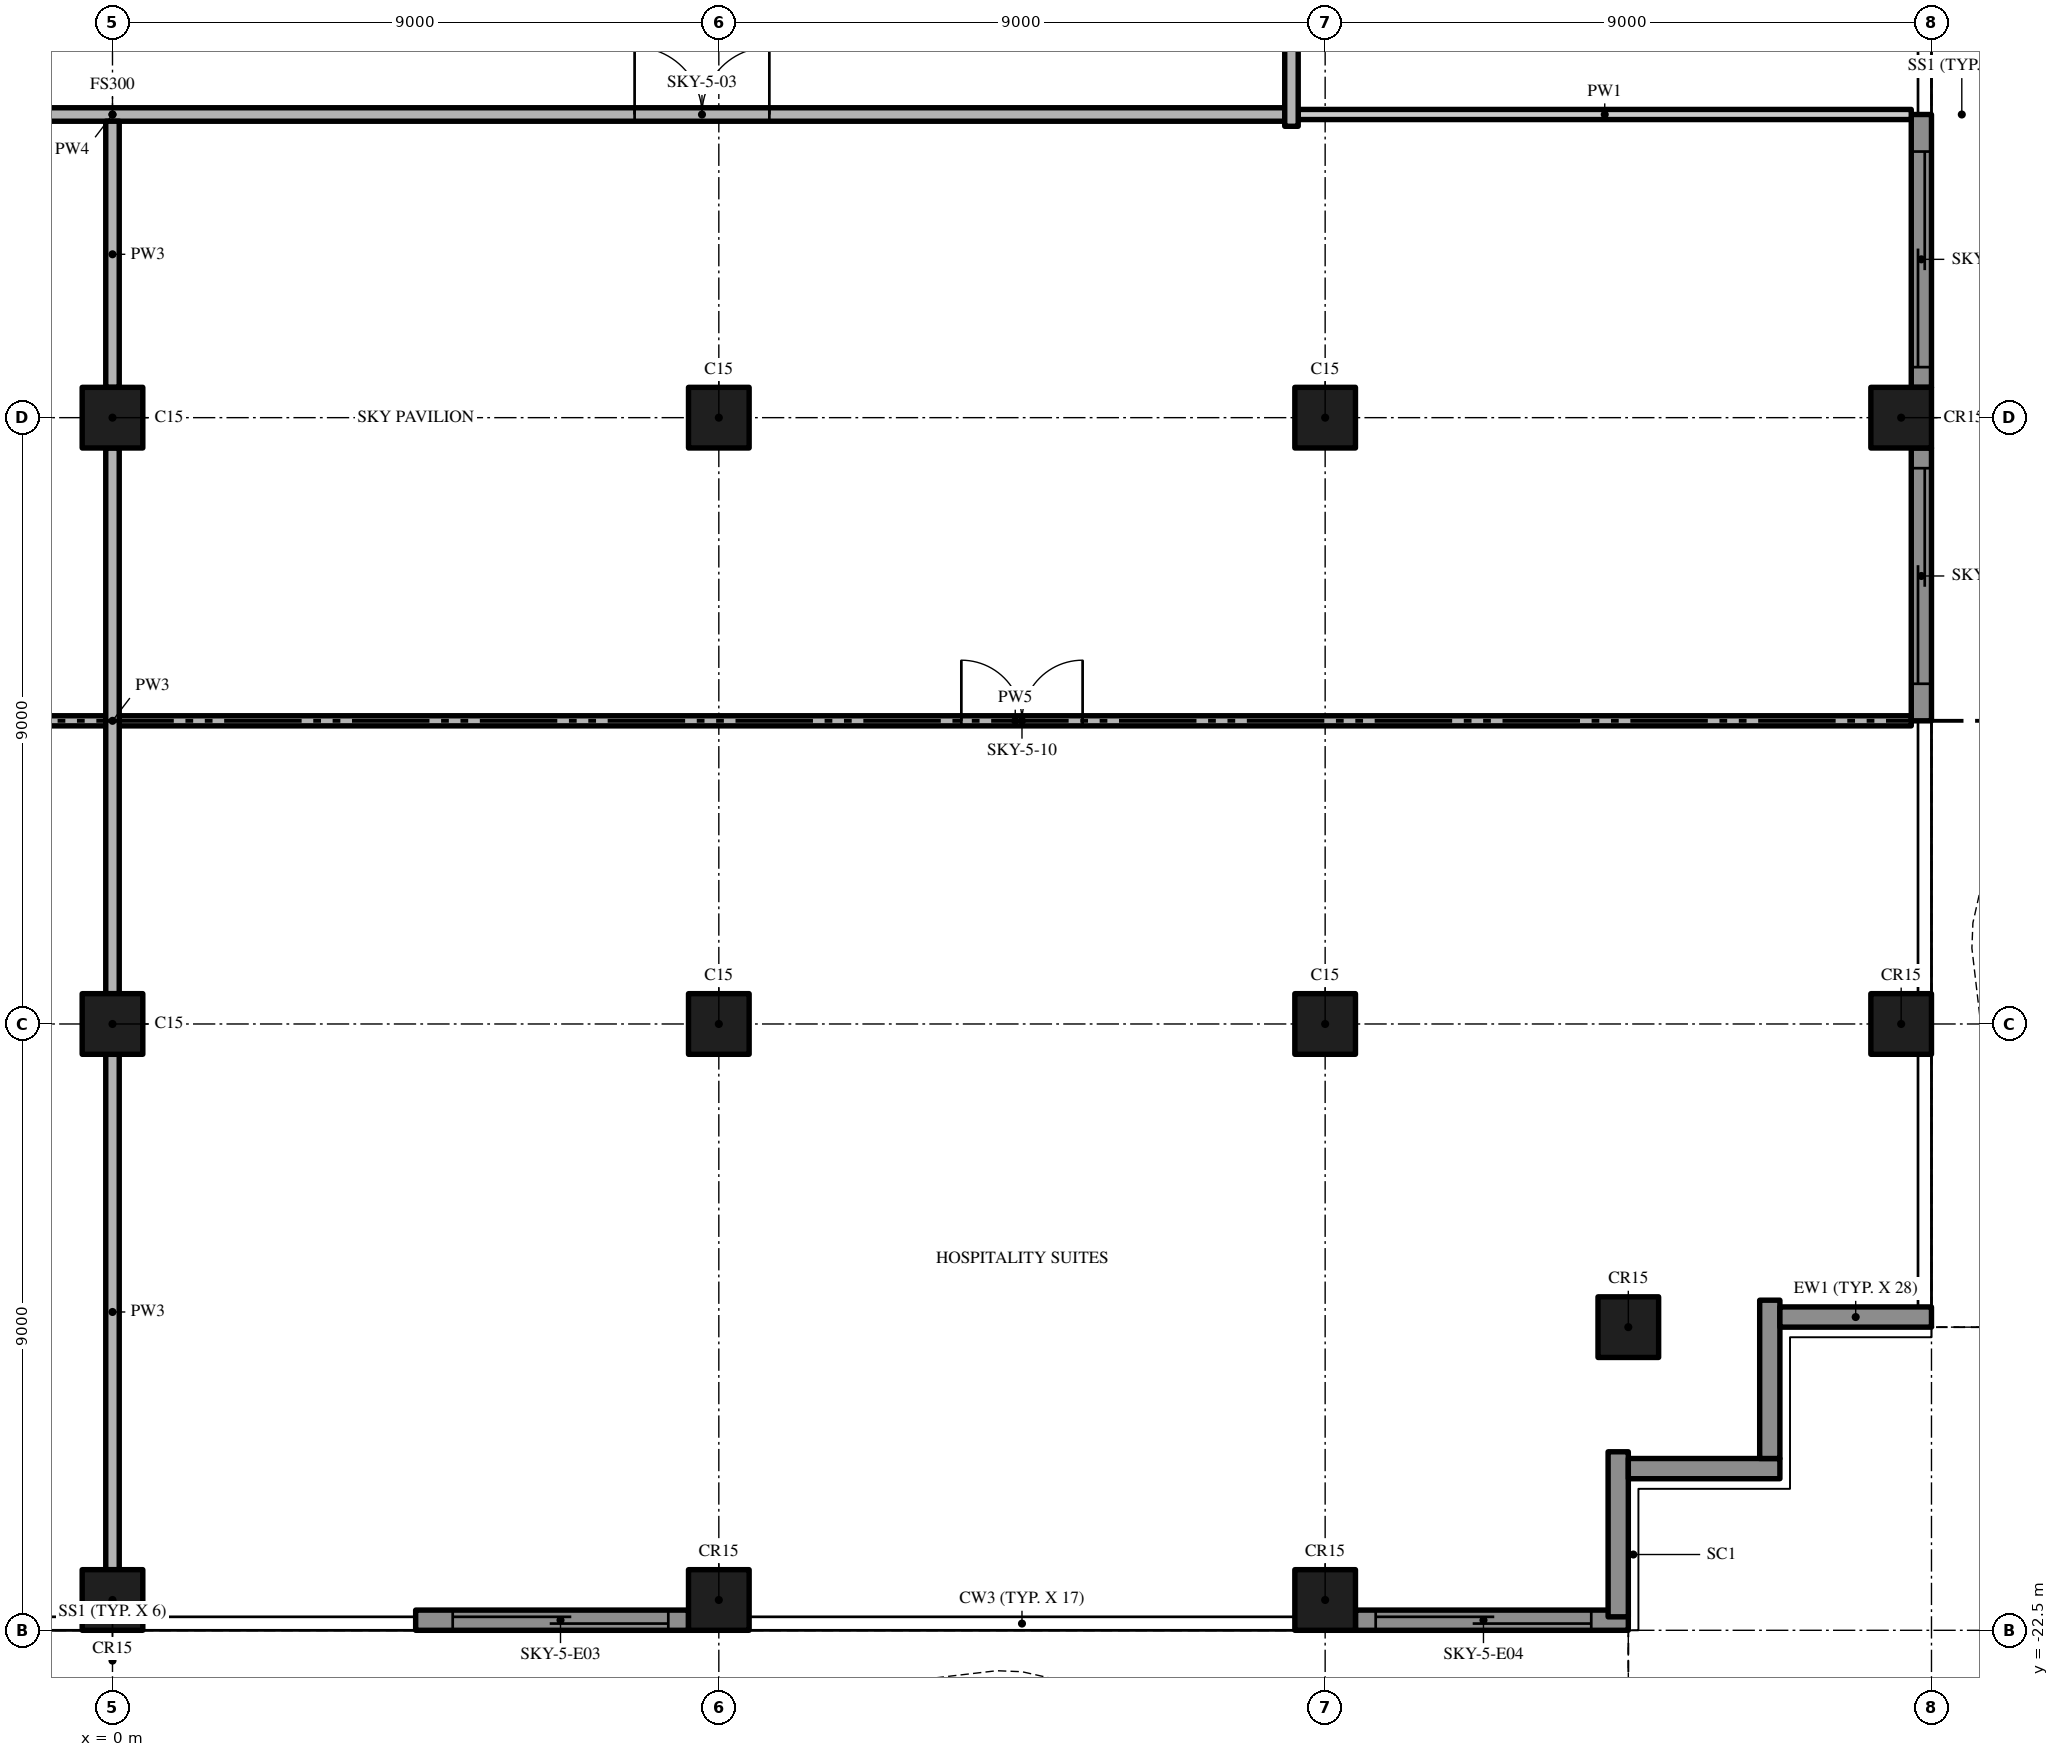
"""IFC4 building model, lengths in metres.
Left out: names, types, materials, properties, quantities, classifications, styles, units other than length and angle.
Written with IfcOpenShell. Run it as: python <this file> out.ifc"""

import sys

from ifc_helpers import new_model, si_unit, direction, frame, frame_2d, origin, origin_2d, place, context, subcontext, project, spatial, polyline, rectangle, outline, extrude, element, fill, save


model = new_model("IFC4")
c1 = context("Model", 3, precision=1e-05, world=origin(), true_north=direction((0.0, 1.0)))
c2 = subcontext(c1, "Body", "Model", "MODEL_VIEW")
j1 = project(units=[si_unit("LENGTHUNIT", "METRE"), si_unit("PLANEANGLEUNIT", "RADIAN")], contexts=[c1])
p1 = place(None, origin())
s1 = spatial("IfcSite", under=j1, at=p1, CompositionType="ELEMENT")
p2 = place(p1, origin())
s2 = spatial("IfcBuilding", under=s1, at=p2, CompositionType="ELEMENT")
p3 = place(p2, frame((0.0, 0.0, 284.4)))
s3 = spatial("IfcBuildingStorey", under=s2, at=p3, CompositionType="ELEMENT", Elevation=284.4)
for number, where, z_axis, x_axis in (
    (1, (0.0, -13.5, 0.0), (0.0, 0.0, 1.0), (1.0, 0.0, 0.0)),
    (2, (0.0, -22.05, 0.0), (0.0, 0.0, 1.0), (1.0, 0.0, 0.0)),
    (3, (0.0, -4.5, 0.0), (0.0, 0.0, 1.0), (1.0, 0.0, 0.0)),
    (4, (18.0, -13.5, 0.0), (0.0, 0.0, 1.0), (1.0, 0.0, 0.0)),
    (5, (18.0, -22.05, 0.0), (0.0, 0.0, 1.0), (1.0, 0.0, 0.0)),
    (6, (18.0, -4.5, 0.0), (0.0, 0.0, 1.0), (1.0, 0.0, 0.0)),
    (7, (26.55, -13.5, 0.0), (0.0, 0.0, 1.0), (1.0, 0.0, 0.0)),
    (8, (22.5, -18.0, 0.0), (0.0, 0.0, 1.0), (1.0, 0.0, 0.0)),
    (9, (26.55, -4.5, 0.0), (0.0, 0.0, 1.0), (1.0, 0.0, 0.0)),
    (10, (9.0, -13.5, 0.0), (0.0, 0.0, 1.0), (1.0, 0.0, 0.0)),
    (11, (9.0, -22.05, 0.0), (0.0, 0.0, 1.0), (1.0, 0.0, 0.0)),
    (12, (9.0, -4.5, 0.0), (0.0, 0.0, 1.0), (1.0, 0.0, 0.0)),
):
    element("IfcColumn", number, at=place(p3, frame(where, z_axis=z_axis, x_axis=x_axis)), inside=s3, PredefinedType="COLUMN", context=c2, shape_type="SweptSolid", body=[
        extrude(rectangle(XDim=0.9, YDim=0.9, at=origin_2d()), origin(), (0.0, 0.0, 1.0), 4.7),
    ])
p4 = place(p3, frame((8.55, -22.35, 0.0), z_axis=(0.0, 0.0, 1.0), x_axis=(-1.0, 0.0, 0.0)))
e13 = element("IfcWall", 13, at=p4, inside=s3, PredefinedType="SOLIDWALL", context=c2, shape_type="SweptSolid", body=[
    extrude(rectangle(XDim=4.05, YDim=0.3, at=frame_2d((2.025, 0.0))), origin(), (0.0, 0.0, 1.0), 4.7),
])
p5 = place(p4, frame((0.3, 0.0, 0.0)))
e14 = element("IfcOpeningElement", 14, at=p5, cuts=e13, PredefinedType="OPENING", context=c2, shape_type="SweptSolid", body=[
    extrude(rectangle(XDim=3.2, YDim=2.4, at=frame_2d((1.6, 1.2))), frame((0.0, 0.16, 0.0), z_axis=(0.0, -1.0, 0.0), x_axis=(1.0, 0.0, 0.0)), (0.0, 0.0, 1.0), 0.32),
])
p6 = place(p3, frame((22.5, -22.35, 0.0), z_axis=(0.0, 0.0, 1.0), x_axis=(-1.0, 0.0, 0.0)))
e15 = element("IfcWall", 15, at=p6, inside=s3, PredefinedType="SOLIDWALL", context=c2, shape_type="SweptSolid", body=[
    extrude(rectangle(XDim=4.05, YDim=0.3, at=frame_2d((2.025, 0.0))), origin(), (0.0, 0.0, 1.0), 4.7),
])
p7 = place(p6, frame((0.55, 0.0, 0.0)))
e16 = element("IfcOpeningElement", 16, at=p7, cuts=e15, PredefinedType="OPENING", context=c2, shape_type="SweptSolid", body=[
    extrude(rectangle(XDim=3.2, YDim=2.4, at=frame_2d((1.6, 1.2))), frame((0.0, 0.16, 0.0), z_axis=(0.0, -1.0, 0.0), x_axis=(1.0, 0.0, 0.0)), (0.0, 0.0, 1.0), 0.32),
])
p8 = place(p3, frame((22.35, -19.85, 0.0), z_axis=(0.0, 0.0, 1.0), x_axis=(0.0, -1.0, 0.0)))
e17 = element("IfcWall", 17, at=p8, inside=s3, PredefinedType="SOLIDWALL", context=c2, shape_type="SweptSolid", body=[
    extrude(rectangle(XDim=2.45, YDim=0.3, at=frame_2d((1.225, 0.0))), origin(), (0.0, 0.0, 1.0), 4.7),
])
p9 = place(p3, frame((24.75, -20.1, 0.0), z_axis=(0.0, 0.0, 1.0), x_axis=(-1.0, 0.0, 0.0)))
e18 = element("IfcWall", 18, at=p9, inside=s3, PredefinedType="SOLIDWALL", context=c2, shape_type="SweptSolid", body=[
    extrude(rectangle(XDim=2.25, YDim=0.3, at=frame_2d((1.125, 0.0))), origin(), (0.0, 0.0, 1.0), 4.7),
])
p10 = place(p3, frame((24.6, -17.6, 0.0), z_axis=(0.0, 0.0, 1.0), x_axis=(0.0, -1.0, 0.0)))
e19 = element("IfcWall", 19, at=p10, inside=s3, PredefinedType="SOLIDWALL", context=c2, shape_type="SweptSolid", body=[
    extrude(rectangle(XDim=2.35, YDim=0.3, at=frame_2d((1.175, 0.0))), origin(), (0.0, 0.0, 1.0), 4.7),
])
p11 = place(p3, frame((27.0, -17.85, 0.0), z_axis=(0.0, 0.0, 1.0), x_axis=(-1.0, 0.0, 0.0)))
e20 = element("IfcWall", 20, at=p11, inside=s3, PredefinedType="SOLIDWALL", context=c2, shape_type="SweptSolid", body=[
    extrude(rectangle(XDim=2.25, YDim=0.3, at=frame_2d((1.125, 0.0))), origin(), (0.0, 0.0, 1.0), 4.7),
])
p12 = place(p3, frame((26.85, -4.95, 0.0), z_axis=(0.0, 0.0, 1.0), x_axis=(0.0, -1.0, 0.0)))
e21 = element("IfcWall", 21, at=p12, inside=s3, PredefinedType="SOLIDWALL", context=c2, shape_type="SweptSolid", body=[
    extrude(rectangle(XDim=4.05, YDim=0.3, at=frame_2d((2.025, 0.0))), origin(), (0.0, 0.0, 1.0), 4.7),
])
p13 = place(p12, frame((0.3, 0.0, 0.0)))
e22 = element("IfcOpeningElement", 22, at=p13, cuts=e21, PredefinedType="OPENING", context=c2, shape_type="SweptSolid", body=[
    extrude(rectangle(XDim=3.2, YDim=2.4, at=frame_2d((1.6, 1.2))), frame((0.0, 0.16, 0.0), z_axis=(0.0, -1.0, 0.0), x_axis=(1.0, 0.0, 0.0)), (0.0, 0.0, 1.0), 0.32),
])
p14 = place(p3, frame((26.85, 0.0, 0.0), z_axis=(0.0, 0.0, 1.0), x_axis=(0.0, -1.0, 0.0)))
e23 = element("IfcWall", 23, at=p14, inside=s3, PredefinedType="SOLIDWALL", context=c2, shape_type="SweptSolid", body=[
    extrude(rectangle(XDim=4.05, YDim=0.3, at=frame_2d((2.025, 0.0))), origin(), (0.0, 0.0, 1.0), 4.7),
])
p15 = place(p14, frame((0.55, 0.0, 0.0)))
e24 = element("IfcOpeningElement", 24, at=p15, cuts=e23, PredefinedType="OPENING", context=c2, shape_type="SweptSolid", body=[
    extrude(rectangle(XDim=3.2, YDim=2.4, at=frame_2d((1.6, 1.2))), frame((0.0, 0.16, 0.0), z_axis=(0.0, -1.0, 0.0), x_axis=(1.0, 0.0, 0.0)), (0.0, 0.0, 1.0), 0.32),
])
p16 = place(p3, origin())
e25 = element("IfcWall", 25, at=p16, inside=s3, PredefinedType="USERDEFINED", context=c2, shape_type="SweptSolid", body=[
    extrude(outline(polyline([(-22.5, -25.149), (-21.0, -24.488), (-19.5, -23.755), (-18.0, -23.231), (-16.875, -23.1), (-16.5, -23.115), (-15.0, -23.451), (-13.5, -24.112), (-12.0, -24.845), (-10.5, -25.369), (-9.375, -25.5), (-9.0, -25.485), (-7.5, -25.149), (-6.0, -24.488), (-4.5, -23.755), (-3.0, -23.231), (-1.875, -23.1), (-1.5, -23.115), (0.0, -23.451), (1.5, -24.112), (3.0, -24.845), (4.5, -25.369), (5.625, -25.5), (6.0, -25.485), (7.5, -25.149), (9.0, -24.488), (10.5, -23.755), (12.0, -23.231), (13.125, -23.1), (13.5, -23.115), (15.0, -23.451), (16.5, -24.112), (18.0, -24.845), (19.5, -25.369), (20.625, -25.5), (21.0, -25.485), (22.5, -25.149), (22.445, -24.905), (20.967, -25.236), (20.635, -25.249), (19.556, -25.124), (18.096, -24.614), (16.605, -23.885), (15.079, -23.213), (13.533, -22.866), (13.115, -22.849), (11.944, -22.986), (10.404, -23.524), (8.895, -24.261), (7.421, -24.91), (5.967, -25.236), (5.635, -25.249), (4.556, -25.124), (3.096, -24.614), (1.605, -23.885), (0.079, -23.213), (-1.467, -22.866), (-1.885, -22.849), (-3.056, -22.986), (-4.596, -23.524), (-6.105, -24.261), (-7.579, -24.91), (-9.033, -25.236), (-9.365, -25.249), (-10.444, -25.124), (-11.904, -24.614), (-13.395, -23.885), (-14.921, -23.213), (-16.467, -22.866), (-16.885, -22.849), (-18.056, -22.986), (-19.596, -23.524), (-21.105, -24.261), (-22.601, -24.92), (-22.5, -25.149)])), origin(), (0.0, 0.0, 1.0), 0.9),
])
p17 = place(p3, origin())
e26 = element("IfcWall", 26, at=p17, inside=s3, PredefinedType="USERDEFINED", context=c2, shape_type="SweptSolid", body=[
    extrude(outline(polyline([(29.649, -18.0), (28.988, -16.5), (28.255, -15.0), (27.731, -13.5), (27.6, -12.375), (27.615, -12.0), (27.951, -10.5), (28.612, -9.0), (29.345, -7.5), (29.869, -6.0), (30.0, -4.875), (29.985, -4.5), (29.649, -3.0), (28.988, -1.5), (28.255, 0.0), (27.731, 1.5), (27.6, 2.625), (27.615, 3.0), (27.951, 4.5), (28.612, 6.0), (29.345, 7.5), (29.869, 9.0), (30.0, 10.125), (29.985, 10.5), (29.649, 12.0), (28.988, 13.5), (28.255, 15.0), (27.731, 16.5), (27.6, 17.625), (27.615, 18.0), (27.365, 18.01), (27.349, 17.615), (27.486, 16.444), (28.024, 14.904), (28.761, 13.395), (29.41, 11.921), (29.736, 10.467), (29.749, 10.135), (29.624, 9.056), (29.114, 7.596), (28.385, 6.105), (27.713, 4.579), (27.366, 3.033), (27.349, 2.615), (27.486, 1.444), (28.024, -0.096), (28.761, -1.605), (29.41, -3.079), (29.736, -4.533), (29.749, -4.865), (29.624, -5.944), (29.114, -7.404), (28.385, -8.895), (27.713, -10.421), (27.366, -11.967), (27.349, -12.385), (27.486, -13.556), (28.024, -15.096), (28.761, -16.605), (29.42, -18.101), (29.649, -18.0)])), origin(), (0.0, 0.0, 1.0), 0.9),
])
p18 = place(p3, frame((-26.7, -9.0, 0.0), z_axis=(0.0, 0.0, 1.0), x_axis=(1.0, 0.0, 0.0)))
e27 = element("IfcWall", 27, at=p18, inside=s3, PredefinedType="PARTITIONING", context=c2, shape_type="SweptSolid", body=[
    extrude(rectangle(XDim=26.6, YDim=0.15, at=frame_2d((13.3, 0.0))), origin(), (0.0, 0.0, 1.0), 4.7),
])
p19 = place(p18, frame((12.3, 0.0, 0.0)))
e28 = element("IfcOpeningElement", 28, at=p19, cuts=e27, PredefinedType="OPENING", context=c2, shape_type="SweptSolid", body=[
    extrude(rectangle(XDim=1.8, YDim=2.4, at=frame_2d((0.9, 1.2))), frame((0.0, 0.085, 0.0), z_axis=(0.0, -1.0, 0.0), x_axis=(1.0, 0.0, 0.0)), (0.0, 0.0, 1.0), 0.17),
])
p20 = place(p3, frame((0.1, -9.0, 0.0), z_axis=(0.0, 0.0, 1.0), x_axis=(1.0, 0.0, 0.0)))
e29 = element("IfcWall", 29, at=p20, inside=s3, PredefinedType="PARTITIONING", context=c2, shape_type="SweptSolid", body=[
    extrude(rectangle(XDim=26.6, YDim=0.15, at=frame_2d((13.3, 0.0))), origin(), (0.0, 0.0, 1.0), 4.7),
])
p21 = place(p20, frame((12.5, 0.0, 0.0)))
e30 = element("IfcOpeningElement", 30, at=p21, cuts=e29, PredefinedType="OPENING", context=c2, shape_type="SweptSolid", body=[
    extrude(rectangle(XDim=1.8, YDim=2.4, at=frame_2d((0.9, 1.2))), frame((0.0, 0.085, 0.0), z_axis=(0.0, -1.0, 0.0), x_axis=(1.0, 0.0, 0.0)), (0.0, 0.0, 1.0), 0.17),
])
p22 = place(p3, frame((-17.4, 0.0, 0.0), z_axis=(0.0, 0.0, 1.0), x_axis=(1.0, 0.0, 0.0)))
e31 = element("IfcWall", 31, at=p22, inside=s3, PredefinedType="PARTITIONING", context=c2, shape_type="SweptSolid", body=[
    extrude(rectangle(XDim=34.8, YDim=0.2, at=frame_2d((17.4, 0.0))), origin(), (0.0, 0.0, 1.0), 4.7),
])
p23 = place(p22, frame((7.65, 0.0, 0.0)))
e32 = element("IfcOpeningElement", 32, at=p23, cuts=e31, PredefinedType="OPENING", context=c2, shape_type="SweptSolid", body=[
    extrude(rectangle(XDim=2.0, YDim=2.4, at=frame_2d((1.0, 1.2))), frame((0.0, 0.11, 0.0), z_axis=(0.0, -1.0, 0.0), x_axis=(1.0, 0.0, 0.0)), (0.0, 0.0, 1.0), 0.22),
])
p24 = place(p22, frame((25.15, 0.0, 0.0)))
e33 = element("IfcOpeningElement", 33, at=p24, cuts=e31, PredefinedType="OPENING", context=c2, shape_type="SweptSolid", body=[
    extrude(rectangle(XDim=2.0, YDim=2.4, at=frame_2d((1.0, 1.2))), frame((0.0, 0.11, 0.0), z_axis=(0.0, -1.0, 0.0), x_axis=(1.0, 0.0, 0.0)), (0.0, 0.0, 1.0), 0.22),
])
p25 = place(p3, frame((17.6, 0.0, 0.0), z_axis=(0.0, 0.0, 1.0), x_axis=(1.0, 0.0, 0.0)))
e34 = element("IfcWall", 34, at=p25, inside=s3, PredefinedType="PARTITIONING", context=c2, shape_type="SweptSolid", body=[
    extrude(rectangle(XDim=9.1, YDim=0.15, at=frame_2d((4.55, 0.0))), origin(), (0.0, 0.0, 1.0), 4.7),
])
p26 = place(p3, frame((0.0, -21.6, 0.0), z_axis=(0.0, 0.0, 1.0), x_axis=(0.0, 1.0, 0.0)))
e35 = element("IfcWall", 35, at=p26, inside=s3, PredefinedType="PARTITIONING", context=c2, shape_type="SweptSolid", body=[
    extrude(rectangle(XDim=7.65, YDim=0.2, at=frame_2d((3.825, 0.0))), origin(), (0.0, 0.0, 1.0), 4.7),
])
p27 = place(p3, frame((0.0, -13.05, 0.0), z_axis=(0.0, 0.0, 1.0), x_axis=(0.0, 1.0, 0.0)))
e36 = element("IfcWall", 36, at=p27, inside=s3, PredefinedType="PARTITIONING", context=c2, shape_type="SweptSolid", body=[
    extrude(rectangle(XDim=8.1, YDim=0.2, at=frame_2d((4.05, 0.0))), origin(), (0.0, 0.0, 1.0), 4.7),
])
p28 = place(p3, frame((0.0, -4.05, 0.0), z_axis=(0.0, 0.0, 1.0), x_axis=(0.0, 1.0, 0.0)))
e37 = element("IfcWall", 37, at=p28, inside=s3, PredefinedType="PARTITIONING", context=c2, shape_type="SweptSolid", body=[
    extrude(rectangle(XDim=3.95, YDim=0.2, at=frame_2d((1.975, 0.0))), origin(), (0.0, 0.0, 1.0), 4.7),
])
p29 = place(p3, frame((17.5, -0.175, 0.0), z_axis=(0.0, 0.0, 1.0), x_axis=(0.0, 1.0, 0.0)))
e38 = element("IfcWall", 38, at=p29, inside=s3, PredefinedType="PARTITIONING", context=c2, shape_type="SweptSolid", body=[
    extrude(rectangle(XDim=4.225, YDim=0.2, at=frame_2d((2.112, 0.0))), origin(), (0.0, 0.0, 1.0), 4.7),
])
p30 = place(p5, origin())
e39 = element("IfcDoor", 39, at=p30, inside=s3, OperationType="SINGLE_SWING_LEFT", PredefinedType="DOOR", context=c2, shape_type="SweptSolid", body=[
    extrude(rectangle(XDim=3.2, YDim=2.4, at=frame_2d((1.6, 1.2))), frame((0.0, 0.025, 0.0), z_axis=(0.0, -1.0, 0.0), x_axis=(1.0, 0.0, 0.0)), (0.0, 0.0, 1.0), 0.05),
])
fill(e14, e39)
p31 = place(p7, origin())
e40 = element("IfcDoor", 40, at=p31, inside=s3, OperationType="SINGLE_SWING_LEFT", PredefinedType="DOOR", context=c2, shape_type="SweptSolid", body=[
    extrude(rectangle(XDim=3.2, YDim=2.4, at=frame_2d((1.6, 1.2))), frame((0.0, 0.025, 0.0), z_axis=(0.0, -1.0, 0.0), x_axis=(1.0, 0.0, 0.0)), (0.0, 0.0, 1.0), 0.05),
])
fill(e16, e40)
p32 = place(p13, origin())
e41 = element("IfcDoor", 41, at=p32, inside=s3, OperationType="SINGLE_SWING_LEFT", PredefinedType="DOOR", context=c2, shape_type="SweptSolid", body=[
    extrude(rectangle(XDim=3.2, YDim=2.4, at=frame_2d((1.6, 1.2))), frame((0.0, 0.025, 0.0), z_axis=(0.0, -1.0, 0.0), x_axis=(1.0, 0.0, 0.0)), (0.0, 0.0, 1.0), 0.05),
])
fill(e22, e41)
p33 = place(p15, origin())
e42 = element("IfcDoor", 42, at=p33, inside=s3, OperationType="SINGLE_SWING_LEFT", PredefinedType="DOOR", context=c2, shape_type="SweptSolid", body=[
    extrude(rectangle(XDim=3.2, YDim=2.4, at=frame_2d((1.6, 1.2))), frame((0.0, 0.025, 0.0), z_axis=(0.0, -1.0, 0.0), x_axis=(1.0, 0.0, 0.0)), (0.0, 0.0, 1.0), 0.05),
])
fill(e24, e42)
p34 = place(p24, origin())
e43 = element("IfcDoor", 43, at=p34, inside=s3, OperationType="DOUBLE_DOOR_SINGLE_SWING", PredefinedType="DOOR", context=c2, shape_type="SweptSolid", body=[
    extrude(rectangle(XDim=2.0, YDim=2.4, at=frame_2d((1.0, 1.2))), frame((0.0, 0.025, 0.0), z_axis=(0.0, -1.0, 0.0), x_axis=(1.0, 0.0, 0.0)), (0.0, 0.0, 1.0), 0.05),
])
fill(e33, e43)
p35 = place(p21, origin())
e44 = element("IfcDoor", 44, at=p35, inside=s3, OperationType="DOUBLE_DOOR_SINGLE_SWING", PredefinedType="DOOR", context=c2, shape_type="SweptSolid", body=[
    extrude(rectangle(XDim=1.8, YDim=2.4, at=frame_2d((0.9, 1.2))), frame((0.0, 0.025, 0.0), z_axis=(0.0, -1.0, 0.0), x_axis=(1.0, 0.0, 0.0)), (0.0, 0.0, 1.0), 0.05),
])
fill(e30, e44)
save(model, sys.argv[1])
